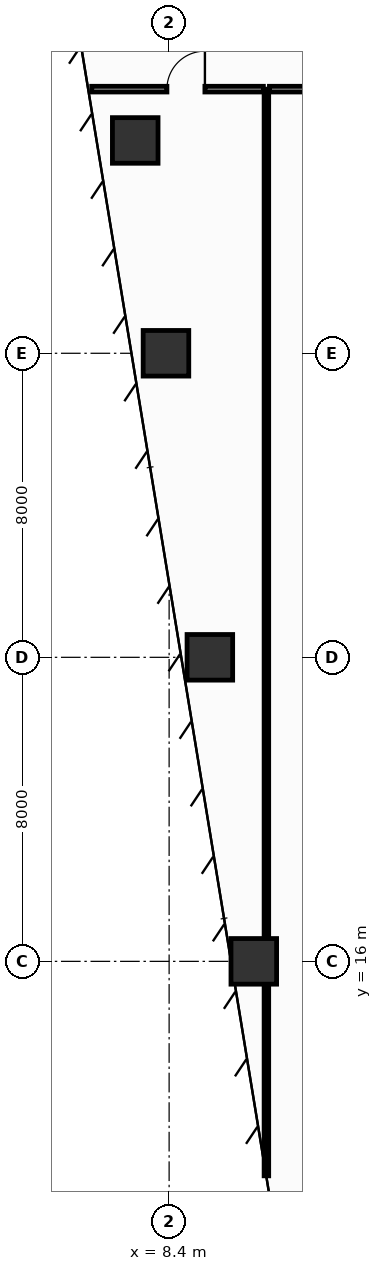
"""IFC4 building model, lengths in metres.
Left out: names, types, materials, properties, quantities, classifications, styles, units other than length and angle.
Written with IfcOpenShell. Run it as: python <this file> out.ifc"""

import sys

from ifc_helpers import new_model, si_unit, direction, frame, frame_2d, origin, origin_2d, place, context, subcontext, project, spatial, rectangle, hollow_rectangle, extrude, element, fill, save


model = new_model("IFC4")
c1 = context("Model", 3, precision=1e-05, world=origin(), true_north=direction((0.0, 1.0)))
c2 = subcontext(c1, "Body", "Model", "MODEL_VIEW")
j1 = project(units=[si_unit("LENGTHUNIT", "METRE"), si_unit("PLANEANGLEUNIT", "RADIAN")], contexts=[c1])
p1 = place(None, origin())
s1 = spatial("IfcSite", under=j1, at=p1, CompositionType="ELEMENT")
p2 = place(p1, origin())
s2 = spatial("IfcBuilding", under=s1, at=p2, CompositionType="ELEMENT")
p3 = place(p2, frame((0.0, 0.0, 78.0)))
s3 = spatial("IfcBuildingStorey", under=s2, at=p3, CompositionType="ELEMENT", Elevation=78.0)
for number, where, z_axis, x_axis in (
    (1, (10.628, 16.0, 0.0), (0.0, 0.0, 1.0), (1.0, 0.0, 0.0)),
    (2, (9.472, 24.0, 0.0), (0.0, 0.0, 1.0), (1.0, 0.0, 0.0)),
    (3, (8.317, 32.0, 0.0), (0.0, 0.0, 1.0), (1.0, 0.0, 0.0)),
    (4, (7.508, 37.6, 0.0), (0.0, 0.0, 1.0), (1.0, 0.0, 0.0)),
):
    element("IfcColumn", number, at=place(p3, frame(where, z_axis=z_axis, x_axis=x_axis)), inside=s3, PredefinedType="COLUMN", context=c2, shape_type="SweptSolid", body=[
        extrude(hollow_rectangle(XDim=1.2, YDim=1.2, WallThickness=0.055, at=origin_2d()), origin(), (0.0, 0.0, 1.0), 4.4),
    ])
p4 = place(p3, frame((10.96, 10.357, 0.0), z_axis=(0.0, 0.0, 1.0), x_axis=(0.0, 1.0, 0.0)))
e5 = element("IfcWall", 5, at=p4, inside=s3, PredefinedType="PARTITIONING", context=c2, shape_type="SweptSolid", body=[
    extrude(rectangle(XDim=28.593, YDim=0.12, at=frame_2d((14.296, 0.0))), origin(), (0.0, 0.0, 1.0), 3.335),
])
p5 = place(p3, frame((6.363, 38.95, 0.0), z_axis=(0.0, 0.0, 1.0), x_axis=(1.0, 0.0, 0.0)))
e6 = element("IfcWall", 6, at=p5, inside=s3, PredefinedType="PARTITIONING", context=c2, shape_type="SweptSolid", body=[
    extrude(rectangle(XDim=4.517, YDim=0.15, at=frame_2d((2.259, 0.0))), origin(), (0.0, 0.0, 1.0), 3.635),
])
p6 = place(p5, frame((1.979, 0.0, 0.0)))
e7 = element("IfcOpeningElement", 7, at=p6, cuts=e6, PredefinedType="OPENING", context=c2, shape_type="SweptSolid", body=[
    extrude(rectangle(XDim=1.0, YDim=2.15, at=frame_2d((0.5, 1.075))), frame((0.0, 0.085, 0.0), z_axis=(0.0, -1.0, 0.0), x_axis=(1.0, 0.0, 0.0)), (0.0, 0.0, 1.0), 0.17),
])
p7 = place(p3, frame((11.04, 38.95, 0.0), z_axis=(0.0, 0.0, 1.0), x_axis=(1.0, 0.0, 0.0)))
e8 = element("IfcWall", 8, at=p7, inside=s3, PredefinedType="PARTITIONING", context=c2, shape_type="SweptSolid", body=[
    extrude(rectangle(XDim=4.14, YDim=0.15, at=frame_2d((2.07, 0.0))), origin(), (0.0, 0.0, 1.0), 4.15),
])
p8 = place(p7, frame((1.57, 0.0, 0.0)))
e9 = element("IfcOpeningElement", 9, at=p8, cuts=e8, PredefinedType="OPENING", context=c2, shape_type="SweptSolid", body=[
    extrude(rectangle(XDim=1.0, YDim=2.15, at=frame_2d((0.5, 1.075))), frame((0.0, 0.085, 0.0), z_axis=(0.0, -1.0, 0.0), x_axis=(1.0, 0.0, 0.0)), (0.0, 0.0, 1.0), 0.17),
])
p9 = place(p6, origin())
e10 = element("IfcDoor", 10, at=p9, inside=s3, OperationType="SINGLE_SWING_RIGHT", PredefinedType="DOOR", context=c2, shape_type="SweptSolid", body=[
    extrude(rectangle(XDim=1.0, YDim=2.15, at=frame_2d((0.5, 1.075))), frame((0.0, 0.025, 0.0), z_axis=(0.0, -1.0, 0.0), x_axis=(1.0, 0.0, 0.0)), (0.0, 0.0, 1.0), 0.05),
])
fill(e7, e10)
save(model, sys.argv[1])
